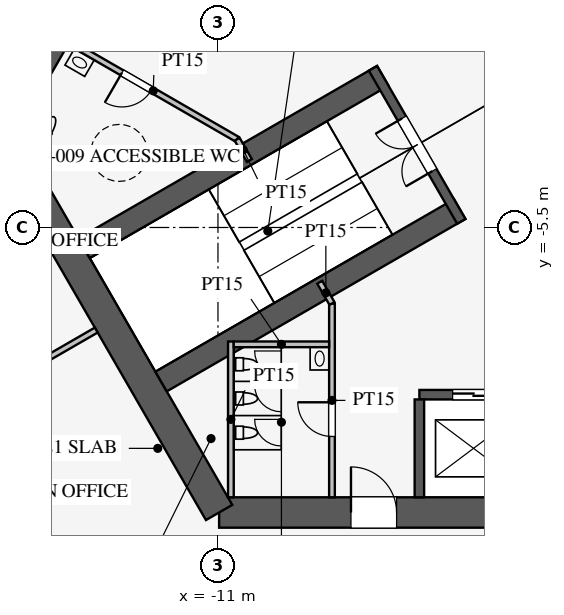
"""IFC4 building model, lengths in metres.
Left out: names, types, materials, properties, quantities, classifications, styles, units other than length and angle.
Written with IfcOpenShell. Run it as: python <this file> out.ifc"""

import sys

from ifc_helpers import new_model, si_unit, direction, frame, frame_2d, origin, place, context, subcontext, project, spatial, rectangle, extrude, element, fill, save


model = new_model("IFC4")
c1 = context("Model", 3, precision=1e-05, world=origin(), true_north=direction((0.0, 1.0)))
c2 = subcontext(c1, "Body", "Model", "MODEL_VIEW")
j1 = project(units=[si_unit("LENGTHUNIT", "METRE"), si_unit("PLANEANGLEUNIT", "RADIAN")], contexts=[c1])
p1 = place(None, origin())
s1 = spatial("IfcSite", under=j1, at=p1, CompositionType="ELEMENT")
p2 = place(p1, origin())
s2 = spatial("IfcBuilding", under=s1, at=p2, CompositionType="ELEMENT")
p3 = place(p2, frame((0.0, 0.0, 219.1)))
s3 = spatial("IfcBuildingStorey", under=s2, at=p3, CompositionType="ELEMENT", Elevation=219.1)
p4 = place(p3, frame((-10.97, -13.0, 0.0), z_axis=(0.0, 0.0, 1.0), x_axis=(1.0, 0.0, 0.0)))
e1 = element("IfcWall", 1, at=p4, inside=s3, PredefinedType="SHEAR", context=c2, shape_type="SweptSolid", body=[
    extrude(rectangle(XDim=21.939, YDim=0.8, at=frame_2d((10.97, 0.0))), origin(), (0.0, 0.0, 1.0), 4.2),
])
p5 = place(p4, frame((17.27, 0.0, 0.0)))
e2 = element("IfcOpeningElement", 2, at=p5, cuts=e1, PredefinedType="OPENING", context=c2, shape_type="SweptSolid", body=[
    extrude(rectangle(XDim=1.2, YDim=2.1, at=frame_2d((0.6, 1.05))), frame((0.0, 0.41, 0.0), z_axis=(0.0, -1.0, 0.0), x_axis=(1.0, 0.0, 0.0)), (0.0, 0.0, 1.0), 0.82),
])
p6 = place(p4, frame((3.47, 0.0, 0.0)))
e3 = element("IfcOpeningElement", 3, at=p6, cuts=e1, PredefinedType="OPENING", context=c2, shape_type="SweptSolid", body=[
    extrude(rectangle(XDim=1.2, YDim=2.1, at=frame_2d((0.6, 1.05))), frame((0.0, 0.41, 0.0), z_axis=(0.0, -1.0, 0.0), x_axis=(1.0, 0.0, 0.0)), (0.0, 0.0, 1.0), 0.82),
])
p7 = place(p3, frame((-5.773, 16.0, 0.0), z_axis=(0.0, 0.0, 1.0), x_axis=(-0.500002442456, -0.866023993627, 0.0)))
e4 = element("IfcWall", 4, at=p7, inside=s3, PredefinedType="SHEAR", context=c2, shape_type="SweptSolid", body=[
    extrude(rectangle(XDim=21.939, YDim=0.8, at=frame_2d((10.97, 0.0))), origin(), (0.0, 0.0, 1.0), 4.2),
])
p8 = place(p7, frame((17.27, 0.0, 0.0)))
e5 = element("IfcOpeningElement", 5, at=p8, cuts=e4, PredefinedType="OPENING", context=c2, shape_type="SweptSolid", body=[
    extrude(rectangle(XDim=1.2, YDim=2.1, at=frame_2d((0.6, 1.05))), frame((0.0, 0.41, 0.0), z_axis=(0.0, -1.0, 0.0), x_axis=(1.0, 0.0, 0.0)), (0.0, 0.0, 1.0), 0.82),
])
p9 = place(p7, frame((3.47, 0.0, 0.0)))
e6 = element("IfcOpeningElement", 6, at=p9, cuts=e4, PredefinedType="OPENING", context=c2, shape_type="SweptSolid", body=[
    extrude(rectangle(XDim=1.2, YDim=2.1, at=frame_2d((0.6, 1.05))), frame((0.0, 0.41, 0.0), z_axis=(0.0, -1.0, 0.0), x_axis=(1.0, 0.0, 0.0)), (0.0, 0.0, 1.0), 0.82),
])
p10 = place(p3, frame((-16.743, -3.0, 0.0), z_axis=(0.0, 0.0, 1.0), x_axis=(0.499995765644, -0.866027848477, 0.0)))
e7 = element("IfcWall", 7, at=p10, inside=s3, PredefinedType="SHEAR", context=c2, shape_type="SweptSolid", body=[
    extrude(rectangle(XDim=11.547, YDim=0.8, at=frame_2d((5.773, 0.0))), origin(), (0.0, 0.0, 1.0), 4.2),
])
p11 = place(p3, frame((-5.7, -9.9, 0.0), z_axis=(0.0, 0.0, 1.0), x_axis=(1.0, 0.0, 0.0)))
e8 = element("IfcWall", 8, at=p11, inside=s3, PredefinedType="SHEAR", context=c2, shape_type="SweptSolid", body=[
    extrude(rectangle(XDim=11.4, YDim=0.25, at=frame_2d((5.7, 0.0))), origin(), (0.0, 0.0, 1.0), 4.2),
])
p12 = place(p11, frame((0.875, 0.0, 0.0)))
e9 = element("IfcOpeningElement", 9, at=p12, cuts=e8, PredefinedType="OPENING", context=c2, shape_type="SweptSolid", body=[
    extrude(rectangle(XDim=1.1, YDim=2.2, at=frame_2d((0.55, 1.1))), frame((0.0, 0.135, 0.0), z_axis=(0.0, -1.0, 0.0), x_axis=(1.0, 0.0, 0.0)), (0.0, 0.0, 1.0), 0.27),
])
p13 = place(p11, frame((3.725, 0.0, 0.0)))
e10 = element("IfcOpeningElement", 10, at=p13, cuts=e8, PredefinedType="OPENING", context=c2, shape_type="SweptSolid", body=[
    extrude(rectangle(XDim=1.1, YDim=2.2, at=frame_2d((0.55, 1.1))), frame((0.0, 0.135, 0.0), z_axis=(0.0, -1.0, 0.0), x_axis=(1.0, 0.0, 0.0)), (0.0, 0.0, 1.0), 0.27),
])
p14 = place(p11, frame((6.575, 0.0, 0.0)))
e11 = element("IfcOpeningElement", 11, at=p14, cuts=e8, PredefinedType="OPENING", context=c2, shape_type="SweptSolid", body=[
    extrude(rectangle(XDim=1.1, YDim=2.2, at=frame_2d((0.55, 1.1))), frame((0.0, 0.135, 0.0), z_axis=(0.0, -1.0, 0.0), x_axis=(1.0, 0.0, 0.0)), (0.0, 0.0, 1.0), 0.27),
])
p15 = place(p11, frame((9.425, 0.0, 0.0)))
e12 = element("IfcOpeningElement", 12, at=p15, cuts=e8, PredefinedType="OPENING", context=c2, shape_type="SweptSolid", body=[
    extrude(rectangle(XDim=1.1, YDim=2.2, at=frame_2d((0.55, 1.1))), frame((0.0, 0.135, 0.0), z_axis=(0.0, -1.0, 0.0), x_axis=(1.0, 0.0, 0.0)), (0.0, 0.0, 1.0), 0.27),
])
p16 = place(p3, frame((-5.7, -10.025, 0.0), z_axis=(0.0, 0.0, 1.0), x_axis=(0.0, -1.0, 0.0)))
e13 = element("IfcWall", 13, at=p16, inside=s3, PredefinedType="SHEAR", context=c2, shape_type="SweptSolid", body=[
    extrude(rectangle(XDim=2.575, YDim=0.25, at=frame_2d((1.288, 0.0))), origin(), (0.0, 0.0, 1.0), 4.2),
])
for number, where, z_axis, x_axis in (
    (14, (-6.663, -1.509, 0.0), (0.0, 0.0, 1.0), (-0.866, -0.5, 0.0)),
    (15, (-4.638, -5.016, 0.0), (0.0, 0.0, 1.0), (-0.866, -0.5, 0.0)),
):
    element("IfcWall", number, at=place(p3, frame(where, z_axis=z_axis, x_axis=x_axis)), inside=s3, PredefinedType="SHEAR", context=c2, shape_type="SweptSolid", body=[
        extrude(rectangle(XDim=9.075, YDim=0.6, at=frame_2d((4.538, 0.0))), origin(), (0.0, 0.0, 1.0), 4.2),
    ])
p17 = place(p3, frame((-6.922, -1.312, 0.0), z_axis=(0.0, 0.0, 1.0), x_axis=(0.499984536904, -0.866034331223, 0.0)))
e16 = element("IfcWall", 16, at=p17, inside=s3, PredefinedType="SHEAR", context=c2, shape_type="SweptSolid", body=[
    extrude(rectangle(XDim=4.65, YDim=0.25, at=frame_2d((2.325, 0.0))), origin(), (0.0, 0.0, 1.0), 4.2),
])
p18 = place(p17, frame((1.525, 0.0, 0.0)))
e17 = element("IfcOpeningElement", 17, at=p18, cuts=e16, PredefinedType="OPENING", context=c2, shape_type="SweptSolid", body=[
    extrude(rectangle(XDim=1.6, YDim=2.1, at=frame_2d((0.8, 1.05))), frame((0.0, 0.135, 0.0), z_axis=(0.0, -1.0, 0.0), x_axis=(1.0, 0.0, 0.0)), (0.0, 0.0, 1.0), 0.27),
])
p19 = place(p3, frame((-8.0, -7.5, 0.0), z_axis=(0.0, 0.0, 1.0), x_axis=(0.0, -1.0, 0.0)))
e18 = element("IfcWall", 18, at=p19, inside=s3, PredefinedType="PARTITIONING", context=c2, shape_type="SweptSolid", body=[
    extrude(rectangle(XDim=5.1, YDim=0.15, at=frame_2d((2.55, 0.0))), origin(), (0.0, 0.0, 1.0), 4.0),
])
p20 = place(p19, frame((2.6, 0.0, 0.0)))
e19 = element("IfcOpeningElement", 19, at=p20, cuts=e18, PredefinedType="OPENING", context=c2, shape_type="SweptSolid", body=[
    extrude(rectangle(XDim=0.9, YDim=2.1, at=frame_2d((0.45, 1.05))), frame((0.0, 0.085, 0.0), z_axis=(0.0, -1.0, 0.0), x_axis=(1.0, 0.0, 0.0)), (0.0, 0.0, 1.0), 0.17),
])
p21 = place(p3, frame((-10.495, -3.178, 0.0), z_axis=(0.0, 0.0, 1.0), x_axis=(-0.86602216432, 0.500005610874, 0.0)))
e20 = element("IfcWall", 20, at=p21, inside=s3, PredefinedType="PARTITIONING", context=c2, shape_type="SweptSolid", body=[
    extrude(rectangle(XDim=5.1, YDim=0.15, at=frame_2d((2.55, 0.0))), origin(), (0.0, 0.0, 1.0), 4.0),
])
p22 = place(p21, frame((2.6, 0.0, 0.0)))
e21 = element("IfcOpeningElement", 21, at=p22, cuts=e20, PredefinedType="OPENING", context=c2, shape_type="SweptSolid", body=[
    extrude(rectangle(XDim=0.9, YDim=2.1, at=frame_2d((0.45, 1.05))), frame((0.0, 0.085, 0.0), z_axis=(0.0, -1.0, 0.0), x_axis=(1.0, 0.0, 0.0)), (0.0, 0.0, 1.0), 0.17),
])
for number, where, z_axis, x_axis in (
    (22, (-10.495, -3.178, 0.0), (0.0, 0.0, 1.0), (0.5, -0.866, 0.0)),
    (23, (-8.0, -7.5, 0.0), (0.0, 0.0, 1.0), (-0.5, 0.866, 0.0)),
):
    element("IfcWall", number, at=place(p3, frame(where, z_axis=z_axis, x_axis=x_axis)), inside=s3, PredefinedType="PARTITIONING", context=c2, shape_type="SweptSolid", body=[
        extrude(rectangle(XDim=0.645, YDim=0.15, at=frame_2d((0.323, 0.0))), origin(), (0.0, 0.0, 1.0), 4.0),
    ])
p23 = place(p3, frame((-10.66, -8.5, 0.0), z_axis=(0.0, 0.0, 1.0), x_axis=(0.0, -1.0, 0.0)))
e24 = element("IfcWall", 24, at=p23, inside=s3, PredefinedType="PARTITIONING", context=c2, shape_type="SweptSolid", body=[
    extrude(rectangle(XDim=4.1, YDim=0.15, at=frame_2d((2.05, 0.0))), origin(), (0.0, 0.0, 1.0), 4.0),
])
p24 = place(p3, frame((-8.075, -8.575, 0.0), z_axis=(0.0, 0.0, 1.0), x_axis=(-1.0, 0.0, 0.0)))
e25 = element("IfcWall", 25, at=p24, inside=s3, PredefinedType="PARTITIONING", context=c2, shape_type="SweptSolid", body=[
    extrude(rectangle(XDim=2.51, YDim=0.15, at=frame_2d((1.255, 0.0))), origin(), (0.0, 0.0, 1.0), 4.0),
])
p25 = place(p3, frame((-14.203, -8.2, 0.0), z_axis=(0.0, 0.0, 1.0), x_axis=(-0.866021600284, -0.500006587798, 0.0)))
e26 = element("IfcWall", 26, at=p25, inside=s3, PredefinedType="PARTITIONING", context=c2, shape_type="SweptSolid", body=[
    extrude(rectangle(XDim=14.95, YDim=0.15, at=frame_2d((7.475, 0.0))), origin(), (0.0, 0.0, 1.0), 2.4),
])
p26 = place(p3, frame((-0.016, 30.491, 0.0), z_axis=(0.0, 0.0, 1.0), x_axis=(-0.50000091641, -0.866024874695, 0.0)))
e27 = element("IfcWall", 27, at=p26, inside=s3, PredefinedType="PARTITIONING", context=c2, shape_type="SweptSolid", body=[
    extrude(rectangle(XDim=52.796, YDim=0.12, at=frame_2d((26.398, 0.0))), origin(), (0.0, 0.0, 1.0), 2.9),
])
p27 = place(p26, frame((10.2, 0.0, 0.15)))
e28 = element("IfcOpeningElement", 28, at=p27, cuts=e27, PredefinedType="OPENING", context=c2, shape_type="SweptSolid", body=[
    extrude(rectangle(XDim=1.8, YDim=2.1, at=frame_2d((0.9, 1.05))), frame((0.0, 0.07, 0.0), z_axis=(0.0, -1.0, 0.0), x_axis=(1.0, 0.0, 0.0)), (0.0, 0.0, 1.0), 0.14),
])
p28 = place(p26, frame((40.8, 0.0, 0.15)))
e29 = element("IfcOpeningElement", 29, at=p28, cuts=e27, PredefinedType="OPENING", context=c2, shape_type="SweptSolid", body=[
    extrude(rectangle(XDim=1.8, YDim=2.1, at=frame_2d((0.9, 1.05))), frame((0.0, 0.07, 0.0), z_axis=(0.0, -1.0, 0.0), x_axis=(1.0, 0.0, 0.0)), (0.0, 0.0, 1.0), 0.14),
])
p29 = place(p20, frame((0.9, 0.0, 0.0), z_axis=(0.0, 0.0, 1.0), x_axis=(-1.0, 0.0, 0.0)))
e30 = element("IfcDoor", 30, at=p29, inside=s3, OperationType="SINGLE_SWING_RIGHT", PredefinedType="DOOR", context=c2, shape_type="SweptSolid", body=[
    extrude(rectangle(XDim=0.9, YDim=2.1, at=frame_2d((0.45, 1.05))), frame((0.0, 0.025, 0.0), z_axis=(0.0, -1.0, 0.0), x_axis=(1.0, 0.0, 0.0)), (0.0, 0.0, 1.0), 0.05),
])
fill(e19, e30)
p30 = place(p22, origin())
e31 = element("IfcDoor", 31, at=p30, inside=s3, OperationType="SINGLE_SWING_RIGHT", PredefinedType="DOOR", context=c2, shape_type="SweptSolid", body=[
    extrude(rectangle(XDim=0.9, YDim=2.1, at=frame_2d((0.45, 1.05))), frame((0.0, 0.025, 0.0), z_axis=(0.0, -1.0, 0.0), x_axis=(1.0, 0.0, 0.0)), (0.0, 0.0, 1.0), 0.05),
])
fill(e21, e31)
p31 = place(p18, frame((1.6, 0.0, 0.0), z_axis=(0.0, 0.0, 1.0), x_axis=(-1.0, 0.0, 0.0)))
e32 = element("IfcDoor", 32, at=p31, inside=s3, OperationType="DOUBLE_DOOR_SINGLE_SWING", PredefinedType="DOOR", context=c2, shape_type="SweptSolid", body=[
    extrude(rectangle(XDim=1.6, YDim=2.1, at=frame_2d((0.8, 1.05))), frame((0.0, 0.025, 0.0), z_axis=(0.0, -1.0, 0.0), x_axis=(1.0, 0.0, 0.0)), (0.0, 0.0, 1.0), 0.05),
])
fill(e17, e32)
p32 = place(p6, origin())
e33 = element("IfcDoor", 33, at=p32, inside=s3, OperationType="SINGLE_SWING_LEFT", PredefinedType="DOOR", context=c2, shape_type="SweptSolid", body=[
    extrude(rectangle(XDim=1.2, YDim=2.1, at=frame_2d((0.6, 1.05))), frame((0.0, 0.025, 0.0), z_axis=(0.0, -1.0, 0.0), x_axis=(1.0, 0.0, 0.0)), (0.0, 0.0, 1.0), 0.05),
])
fill(e3, e33)
p33 = place(p12, origin())
e34 = element("IfcDoor", 34, at=p33, inside=s3, OperationType="DOUBLE_DOOR_SLIDING", PredefinedType="DOOR", context=c2, shape_type="SweptSolid", body=[
    extrude(rectangle(XDim=1.1, YDim=2.2, at=frame_2d((0.55, 1.1))), frame((0.0, 0.025, 0.0), z_axis=(0.0, -1.0, 0.0), x_axis=(1.0, 0.0, 0.0)), (0.0, 0.0, 1.0), 0.05),
])
fill(e9, e34)
save(model, sys.argv[1])
